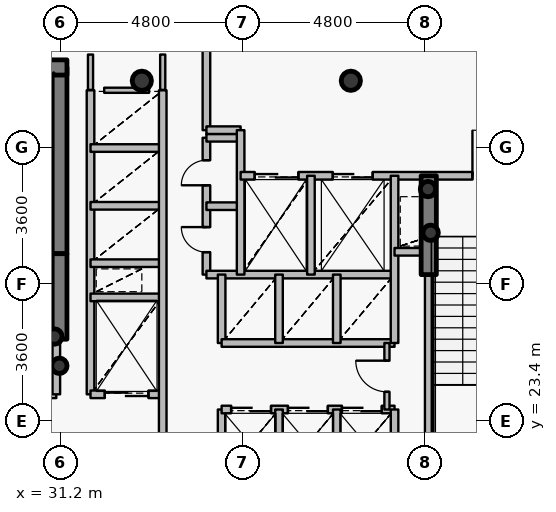
"""IFC4 building model, lengths in metres.
Left out: names, types, materials, properties, quantities, classifications, styles, units other than length and angle.
Written with IfcOpenShell. Run it as: python <this file> out.ifc"""

import sys

from ifc_helpers import new_model, si_unit, direction, frame, frame_2d, origin, origin_2d, place, context, subcontext, project, spatial, rectangle, hollow_circle, extrude, source, transform, mapped, element, fill, save


model = new_model("IFC4")
c1 = context("Model", 3, precision=1e-05, world=origin(), true_north=direction((0.0, 1.0)))
c2 = subcontext(c1, "Body", "Model", "MODEL_VIEW")
j1 = project(units=[si_unit("LENGTHUNIT", "METRE"), si_unit("PLANEANGLEUNIT", "RADIAN")], contexts=[c1])
p1 = place(None, origin())
s1 = spatial("IfcSite", under=j1, at=p1, CompositionType="ELEMENT")
p2 = place(p1, origin())
s2 = spatial("IfcBuilding", under=s1, at=p2, CompositionType="ELEMENT")
p3 = place(p2, frame((0.0, 0.0, 70.2)))
s3 = spatial("IfcBuildingStorey", under=s2, at=p3, CompositionType="ELEMENT", Elevation=70.2)
for number, where, z_axis, x_axis in (
    (1, (38.85, 32.35, 0.0), (0.0, 0.0, 1.0), (1.0, 0.0, 0.0)),
    (2, (33.35, 32.35, 0.0), (0.0, 0.0, 1.0), (1.0, 0.0, 0.0)),
):
    element("IfcColumn", number, at=place(p3, frame(where, z_axis=z_axis, x_axis=x_axis)), inside=s3, PredefinedType="COLUMN", context=c2, shape_type="SweptSolid", body=[
        extrude(hollow_circle(Radius=0.254, WallThickness=0.02, at=origin_2d()), origin(), (0.0, 0.0, 1.0), 4.2),
    ])
p4 = place(p3, frame((31.18, 27.8, 0.0), z_axis=(0.0, 0.0, 1.0), x_axis=(0.0, 1.0, 0.0)))
e3 = element("IfcWall", 3, at=p4, inside=s3, PredefinedType="SHEAR", context=c2, shape_type="SweptSolid", body=[
    extrude(rectangle(XDim=4.9, YDim=0.4, at=frame_2d((2.45, 0.0))), origin(), (0.0, 0.0, 1.0), 4.2),
])
p5 = place(p3, frame((27.28, 32.7, 0.0), z_axis=(0.0, 0.0, 1.0), x_axis=(1.0, 0.0, 0.0)))
e4 = element("IfcWall", 4, at=p5, inside=s3, PredefinedType="SHEAR", context=c2, shape_type="SweptSolid", body=[
    extrude(rectangle(XDim=4.1, YDim=0.4, at=frame_2d((2.05, 0.0))), origin(), (0.0, 0.0, 1.0), 4.2),
])
for number, where, z_axis, x_axis in (
    (5, (31.05, 25.62, 0.0), (0.0, 0.0, 1.0), (1.0, 0.0, 0.0)),
    (6, (31.18, 24.85, 0.0), (0.0, 0.0, 1.0), (1.0, 0.0, 0.0)),
    (7, (40.95, 28.35, 0.0), (0.0, 0.0, 1.0), (1.0, 0.0, 0.0)),
    (8, (40.88, 29.5, 0.0), (0.0, 0.0, 1.0), (1.0, 0.0, 0.0)),
):
    element("IfcColumn", number, at=place(p3, frame(where, z_axis=z_axis, x_axis=x_axis)), inside=s3, PredefinedType="COLUMN", context=c2, shape_type="SweptSolid", body=[
        extrude(hollow_circle(Radius=0.203, WallThickness=0.016, at=origin_2d()), origin(), (0.0, 0.0, 1.0), 4.2),
    ])
p6 = place(p3, frame((31.18, 25.55, 0.0), z_axis=(0.0, 0.0, 1.0), x_axis=(0.0, 1.0, 0.0)))
e9 = element("IfcWall", 9, at=p6, inside=s3, PredefinedType="SHEAR", context=c2, shape_type="SweptSolid", body=[
    extrude(rectangle(XDim=2.25, YDim=0.4, at=frame_2d((1.125, 0.0))), origin(), (0.0, 0.0, 1.0), 3.55),
])
p7 = place(p3, frame((40.9, 27.25, 0.0), z_axis=(0.0, 0.0, 1.0), x_axis=(0.0, 1.0, 0.0)))
e10 = element("IfcWall", 10, at=p7, inside=s3, PredefinedType="SHEAR", context=c2, shape_type="SweptSolid", body=[
    extrude(rectangle(XDim=2.6, YDim=0.4, at=frame_2d((1.3, 0.0))), origin(), (0.0, 0.0, 1.0), 3.55),
])
p8 = place(p3, frame((27.56, 24.1, 0.0), z_axis=(0.0, 0.0, 1.0), x_axis=(1.0, 0.0, 0.0)))
e11 = element("IfcWall", 11, at=p8, inside=s3, PredefinedType="PARTITIONING", context=c2, shape_type="SweptSolid", body=[
    extrude(rectangle(XDim=3.54, YDim=0.2, at=frame_2d((1.77, 0.0))), origin(), (0.0, 0.0, 1.0), 3.95),
])
p9 = place(p8, frame((1.17, 0.0, 0.0)))
e12 = element("IfcOpeningElement", 12, at=p9, cuts=e11, PredefinedType="OPENING", context=c2, shape_type="SweptSolid", body=[
    extrude(rectangle(XDim=1.2, YDim=2.15, at=origin_2d()), frame((0.6, 0.11, 1.075), z_axis=(0.0, -1.0, 0.0), x_axis=(1.0, 0.0, 0.0)), (0.0, 0.0, 1.0), 0.22),
])
p10 = place(p3, frame((31.1, 24.1, 0.0), z_axis=(0.0, 0.0, 1.0), x_axis=(0.0, 1.0, 0.0)))
e13 = element("IfcWall", 13, at=p10, inside=s3, PredefinedType="PARTITIONING", context=c2, shape_type="SweptSolid", body=[
    extrude(rectangle(XDim=1.44, YDim=0.2, at=frame_2d((0.72, 0.0))), origin(), (0.0, 0.0, 1.0), 3.95),
])
p11 = place(p3, frame((32.0, 24.1, 0.0), z_axis=(0.0, 0.0, 1.0), x_axis=(0.0, 1.0, 0.0)))
e14 = element("IfcWall", 14, at=p11, inside=s3, PredefinedType="PARTITIONING", context=c2, shape_type="SweptSolid", body=[
    extrude(rectangle(XDim=8.0, YDim=0.2, at=frame_2d((4.0, 0.0))), origin(), (0.0, 0.0, 1.0), 3.95),
])
p12 = place(p3, frame((32.0, 24.1, 0.0), z_axis=(0.0, 0.0, 1.0), x_axis=(1.0, 0.0, 0.0)))
e15 = element("IfcWall", 15, at=p12, inside=s3, PredefinedType="PARTITIONING", context=c2, shape_type="SweptSolid", body=[
    extrude(rectangle(XDim=1.9, YDim=0.2, at=frame_2d((0.95, 0.0))), origin(), (0.0, 0.0, 1.0), 3.535),
])
p13 = place(p12, frame((0.375, 0.0, 0.0)))
e16 = element("IfcOpeningElement", 16, at=p13, cuts=e15, PredefinedType="OPENING", context=c2, shape_type="SweptSolid", body=[
    extrude(rectangle(XDim=1.15, YDim=2.15, at=origin_2d()), frame((0.575, 0.11, 1.075), z_axis=(0.0, -1.0, 0.0), x_axis=(1.0, 0.0, 0.0)), (0.0, 0.0, 1.0), 0.22),
])
for number, where, z_axis, x_axis in (
    (17, (32.0, 26.65, 0.0), (0.0, 0.0, 1.0), (1.0, 0.0, 0.0)),
    (18, (32.0, 27.55, 0.0), (0.0, 0.0, 1.0), (1.0, 0.0, 0.0)),
    (19, (32.0, 29.06, 0.0), (0.0, 0.0, 1.0), (1.0, 0.0, 0.0)),
    (20, (32.0, 30.58, 0.0), (0.0, 0.0, 1.0), (1.0, 0.0, 0.0)),
):
    element("IfcWall", number, at=place(p3, frame(where, z_axis=z_axis, x_axis=x_axis)), inside=s3, PredefinedType="PARTITIONING", context=c2, shape_type="SweptSolid", body=[
        extrude(rectangle(XDim=1.9, YDim=0.2, at=frame_2d((0.95, 0.0))), origin(), (0.0, 0.0, 1.0), 3.535),
    ])
p14 = place(p3, frame((33.9, 20.7, 0.0), z_axis=(0.0, 0.0, 1.0), x_axis=(0.0, 1.0, 0.0)))
e21 = element("IfcWall", 21, at=p14, inside=s3, PredefinedType="PARTITIONING", context=c2, shape_type="SweptSolid", body=[
    extrude(rectangle(XDim=11.4, YDim=0.2, at=frame_2d((5.7, 0.0))), origin(), (0.0, 0.0, 1.0), 3.535),
])
p15 = place(p3, frame((35.05, 27.25, 0.0), z_axis=(0.0, 0.0, 1.0), x_axis=(0.0, 1.0, 0.0)))
e22 = element("IfcWall", 22, at=p15, inside=s3, PredefinedType="PARTITIONING", context=c2, shape_type="SweptSolid", body=[
    extrude(rectangle(XDim=3.6, YDim=0.2, at=frame_2d((1.8, 0.0))), origin(), (0.0, 0.0, 1.0), 3.95),
])
p16 = place(p15, frame((0.59, 0.0, 0.0)))
e23 = element("IfcOpeningElement", 23, at=p16, cuts=e22, PredefinedType="OPENING", context=c2, shape_type="SweptSolid", body=[
    extrude(rectangle(XDim=0.66, YDim=2.05, at=origin_2d()), frame((0.33, 0.11, 1.025), z_axis=(0.0, -1.0, 0.0), x_axis=(1.0, 0.0, 0.0)), (0.0, 0.0, 1.0), 0.22),
])
p17 = place(p15, frame((2.35, 0.0, 0.0)))
e24 = element("IfcOpeningElement", 24, at=p17, cuts=e22, PredefinedType="OPENING", context=c2, shape_type="SweptSolid", body=[
    extrude(rectangle(XDim=0.66, YDim=2.05, at=origin_2d()), frame((0.33, 0.11, 1.025), z_axis=(0.0, -1.0, 0.0), x_axis=(1.0, 0.0, 0.0)), (0.0, 0.0, 1.0), 0.22),
])
p18 = place(p3, frame((35.05, 27.25, 0.0), z_axis=(0.0, 0.0, 1.0), x_axis=(1.0, 0.0, 0.0)))
e25 = element("IfcWall", 25, at=p18, inside=s3, PredefinedType="PARTITIONING", context=c2, shape_type="SweptSolid", body=[
    extrude(rectangle(XDim=4.95, YDim=0.2, at=frame_2d((2.475, 0.0))), origin(), (0.0, 0.0, 1.0), 3.535),
])
for number, where, z_axis, x_axis in (
    (26, (35.05, 29.05, 0.0), (0.0, 0.0, 1.0), (1.0, 0.0, 0.0)),
    (27, (35.05, 30.85, 0.0), (0.0, 0.0, 1.0), (1.0, 0.0, 0.0)),
):
    element("IfcWall", number, at=place(p3, frame(where, z_axis=z_axis, x_axis=x_axis)), inside=s3, PredefinedType="PARTITIONING", context=c2, shape_type="SweptSolid", body=[
        extrude(rectangle(XDim=0.9, YDim=0.2, at=frame_2d((0.45, 0.0))), origin(), (0.0, 0.0, 1.0), 3.95),
    ])
p19 = place(p3, frame((35.05, 31.05, 0.0), z_axis=(0.0, 0.0, 1.0), x_axis=(0.0, 1.0, 0.0)))
e28 = element("IfcWall", 28, at=p19, inside=s3, PredefinedType="PARTITIONING", context=c2, shape_type="SweptSolid", body=[
    extrude(rectangle(XDim=2.25, YDim=0.2, at=frame_2d((1.125, 0.0))), origin(), (0.0, 0.0, 1.0), 3.535),
])
p20 = place(p3, frame((35.05, 31.05, 0.0), z_axis=(0.0, 0.0, 1.0), x_axis=(1.0, 0.0, 0.0)))
e29 = element("IfcWall", 29, at=p20, inside=s3, PredefinedType="PARTITIONING", context=c2, shape_type="SweptSolid", body=[
    extrude(rectangle(XDim=0.9, YDim=0.2, at=frame_2d((0.45, 0.0))), origin(), (0.0, 0.0, 1.0), 3.95),
])
p21 = place(p3, frame((35.45, 21.9, 0.0), z_axis=(0.0, 0.0, 1.0), x_axis=(0.0, 1.0, 0.0)))
e30 = element("IfcWall", 30, at=p21, inside=s3, PredefinedType="PARTITIONING", context=c2, shape_type="SweptSolid", body=[
    extrude(rectangle(XDim=1.8, YDim=0.2, at=frame_2d((0.9, 0.0))), origin(), (0.0, 0.0, 1.0), 3.95),
])
p22 = place(p3, frame((35.45, 23.7, 0.0), z_axis=(0.0, 0.0, 1.0), x_axis=(1.0, 0.0, 0.0)))
e31 = element("IfcWall", 31, at=p22, inside=s3, PredefinedType="PARTITIONING", context=c2, shape_type="SweptSolid", body=[
    extrude(rectangle(XDim=4.55, YDim=0.2, at=frame_2d((2.275, 0.0))), origin(), (0.0, 0.0, 1.0), 3.535),
])
p23 = place(p22, frame((0.25, 0.0, 0.0)))
e32 = element("IfcOpeningElement", 32, at=p23, cuts=e31, PredefinedType="OPENING", context=c2, shape_type="SweptSolid", body=[
    extrude(rectangle(XDim=1.05, YDim=2.15, at=origin_2d()), frame((0.525, 0.11, 1.075), z_axis=(0.0, -1.0, 0.0), x_axis=(1.0, 0.0, 0.0)), (0.0, 0.0, 1.0), 0.22),
])
p24 = place(p22, frame((1.745, 0.0, 0.0)))
e33 = element("IfcOpeningElement", 33, at=p24, cuts=e31, PredefinedType="OPENING", context=c2, shape_type="SweptSolid", body=[
    extrude(rectangle(XDim=1.05, YDim=2.15, at=origin_2d()), frame((0.525, 0.11, 1.075), z_axis=(0.0, -1.0, 0.0), x_axis=(1.0, 0.0, 0.0)), (0.0, 0.0, 1.0), 0.22),
])
p25 = place(p22, frame((3.165, 0.0, 0.0)))
e34 = element("IfcOpeningElement", 34, at=p25, cuts=e31, PredefinedType="OPENING", context=c2, shape_type="SweptSolid", body=[
    extrude(rectangle(XDim=1.05, YDim=2.15, at=origin_2d()), frame((0.525, 0.11, 1.075), z_axis=(0.0, -1.0, 0.0), x_axis=(1.0, 0.0, 0.0)), (0.0, 0.0, 1.0), 0.22),
])
p26 = place(p3, frame((35.45, 25.45, 0.0), z_axis=(0.0, 0.0, 1.0), x_axis=(0.0, 1.0, 0.0)))
e35 = element("IfcWall", 35, at=p26, inside=s3, PredefinedType="PARTITIONING", context=c2, shape_type="SweptSolid", body=[
    extrude(rectangle(XDim=1.8, YDim=0.2, at=frame_2d((0.9, 0.0))), origin(), (0.0, 0.0, 1.0), 3.95),
])
p27 = place(p3, frame((35.45, 25.45, 0.0), z_axis=(0.0, 0.0, 1.0), x_axis=(1.0, 0.0, 0.0)))
e36 = element("IfcWall", 36, at=p27, inside=s3, PredefinedType="PARTITIONING", context=c2, shape_type="SweptSolid", body=[
    extrude(rectangle(XDim=4.55, YDim=0.2, at=frame_2d((2.275, 0.0))), origin(), (0.0, 0.0, 1.0), 3.535),
])
p28 = place(p3, frame((35.95, 27.25, 0.0), z_axis=(0.0, 0.0, 1.0), x_axis=(0.0, 1.0, 0.0)))
e37 = element("IfcWall", 37, at=p28, inside=s3, PredefinedType="PARTITIONING", context=c2, shape_type="SweptSolid", body=[
    extrude(rectangle(XDim=3.8, YDim=0.2, at=frame_2d((1.9, 0.0))), origin(), (0.0, 0.0, 1.0), 3.95),
])
p29 = place(p3, frame((35.95, 29.85, 0.0), z_axis=(0.0, 0.0, 1.0), x_axis=(1.0, 0.0, 0.0)))
e38 = element("IfcWall", 38, at=p29, inside=s3, PredefinedType="PARTITIONING", context=c2, shape_type="SweptSolid", body=[
    extrude(rectangle(XDim=8.49, YDim=0.2, at=frame_2d((4.245, 0.0))), origin(), (0.0, 0.0, 1.0), 3.535),
])
p30 = place(p29, frame((6.1, 0.0, 0.0)))
e39 = element("IfcOpeningElement", 39, at=p30, cuts=e38, PredefinedType="OPENING", context=c2, shape_type="SweptSolid", body=[
    extrude(rectangle(XDim=1.2, YDim=2.15, at=origin_2d()), frame((0.6, 0.11, 1.075), z_axis=(0.0, -1.0, 0.0), x_axis=(1.0, 0.0, 0.0)), (0.0, 0.0, 1.0), 0.22),
])
p31 = place(p29, frame((0.37, 0.0, 0.0)))
e40 = element("IfcOpeningElement", 40, at=p31, cuts=e38, PredefinedType="OPENING", context=c2, shape_type="SweptSolid", body=[
    extrude(rectangle(XDim=1.15, YDim=2.15, at=origin_2d()), frame((0.575, 0.11, 1.075), z_axis=(0.0, -1.0, 0.0), x_axis=(1.0, 0.0, 0.0)), (0.0, 0.0, 1.0), 0.22),
])
p32 = place(p29, frame((2.425, 0.0, 0.0)))
e41 = element("IfcOpeningElement", 41, at=p32, cuts=e38, PredefinedType="OPENING", context=c2, shape_type="SweptSolid", body=[
    extrude(rectangle(XDim=1.05, YDim=2.15, at=origin_2d()), frame((0.525, 0.11, 1.075), z_axis=(0.0, -1.0, 0.0), x_axis=(1.0, 0.0, 0.0)), (0.0, 0.0, 1.0), 0.22),
])
for number, where, z_axis, x_axis in (
    (42, (36.96, 21.9, 0.0), (0.0, 0.0, 1.0), (0.0, 1.0, 0.0)),
    (43, (36.96, 25.45, 0.0), (0.0, 0.0, 1.0), (0.0, 1.0, 0.0)),
):
    element("IfcWall", number, at=place(p3, frame(where, z_axis=z_axis, x_axis=x_axis)), inside=s3, PredefinedType="PARTITIONING", context=c2, shape_type="SweptSolid", body=[
        extrude(rectangle(XDim=1.8, YDim=0.2, at=frame_2d((0.9, 0.0))), origin(), (0.0, 0.0, 1.0), 3.95),
    ])
p33 = place(p3, frame((37.8, 27.25, 0.0), z_axis=(0.0, 0.0, 1.0), x_axis=(0.0, 1.0, 0.0)))
e44 = element("IfcWall", 44, at=p33, inside=s3, PredefinedType="PARTITIONING", context=c2, shape_type="SweptSolid", body=[
    extrude(rectangle(XDim=2.6, YDim=0.2, at=frame_2d((1.3, 0.0))), origin(), (0.0, 0.0, 1.0), 3.95),
])
for number, where, z_axis, x_axis in (
    (45, (38.48, 21.9, 0.0), (0.0, 0.0, 1.0), (0.0, 1.0, 0.0)),
    (46, (38.48, 25.45, 0.0), (0.0, 0.0, 1.0), (0.0, 1.0, 0.0)),
):
    element("IfcWall", number, at=place(p3, frame(where, z_axis=z_axis, x_axis=x_axis)), inside=s3, PredefinedType="PARTITIONING", context=c2, shape_type="SweptSolid", body=[
        extrude(rectangle(XDim=1.8, YDim=0.2, at=frame_2d((0.9, 0.0))), origin(), (0.0, 0.0, 1.0), 3.95),
    ])
p34 = place(p3, frame((39.8, 23.7, 0.0), z_axis=(0.0, 0.0, 1.0), x_axis=(0.0, 1.0, 0.0)))
e47 = element("IfcWall", 47, at=p34, inside=s3, PredefinedType="PARTITIONING", context=c2, shape_type="SweptSolid", body=[
    extrude(rectangle(XDim=1.75, YDim=0.135, at=frame_2d((0.875, 0.0))), origin(), (0.0, 0.0, 1.0), 3.95),
])
p35 = place(p34, frame((0.465, 0.0, 0.0)))
e48 = element("IfcOpeningElement", 48, at=p35, cuts=e47, PredefinedType="OPENING", context=c2, shape_type="SweptSolid", body=[
    extrude(rectangle(XDim=0.82, YDim=2.1, at=origin_2d()), frame((0.41, 0.078, 1.05), z_axis=(0.0, -1.0, 0.0), x_axis=(1.0, 0.0, 0.0)), (0.0, 0.0, 1.0), 0.155),
])
p36 = place(p3, frame((40.0, 21.9, 0.0), z_axis=(0.0, 0.0, 1.0), x_axis=(0.0, 1.0, 0.0)))
e49 = element("IfcWall", 49, at=p36, inside=s3, PredefinedType="PARTITIONING", context=c2, shape_type="SweptSolid", body=[
    extrude(rectangle(XDim=1.8, YDim=0.2, at=frame_2d((0.9, 0.0))), origin(), (0.0, 0.0, 1.0), 3.95),
])
p37 = place(p3, frame((40.0, 25.45, 0.0), z_axis=(0.0, 0.0, 1.0), x_axis=(0.0, 1.0, 0.0)))
e50 = element("IfcWall", 50, at=p37, inside=s3, PredefinedType="PARTITIONING", context=c2, shape_type="SweptSolid", body=[
    extrude(rectangle(XDim=4.4, YDim=0.2, at=frame_2d((2.2, 0.0))), origin(), (0.0, 0.0, 1.0), 3.95),
])
p38 = place(p3, frame((40.0, 27.85, 0.0), z_axis=(0.0, 0.0, 1.0), x_axis=(1.0, 0.0, 0.0)))
e51 = element("IfcWall", 51, at=p38, inside=s3, PredefinedType="PARTITIONING", context=c2, shape_type="SweptSolid", body=[
    extrude(rectangle(XDim=0.9, YDim=0.2, at=frame_2d((0.45, 0.0))), origin(), (0.0, 0.0, 1.0), 3.95),
])
p39 = place(p3, frame((40.9, 21.33, 0.0), z_axis=(0.0, 0.0, 1.0), x_axis=(0.0, 1.0, 0.0)))
e52 = element("IfcWall", 52, at=p39, inside=s3, PredefinedType="PARTITIONING", context=c2, shape_type="SweptSolid", body=[
    extrude(rectangle(XDim=5.91, YDim=0.2, at=frame_2d((2.955, 0.0))), origin(), (0.0, 0.0, 1.0), 3.485),
])
p40 = place(p3, frame((32.36, 32.1, 0.0), z_axis=(0.0, 0.0, 1.0), x_axis=(1.0, 0.0, 0.0)))
e53 = element("IfcWall", 53, at=p40, inside=s3, PredefinedType="PARTITIONING", context=c2, shape_type="SweptSolid", body=[
    extrude(rectangle(XDim=1.18, YDim=0.135, at=frame_2d((0.59, 0.0))), origin(), (0.0, 0.0, 1.0), 3.535),
])
p41 = place(p3, frame((32.0, 33.04, 0.0), z_axis=(0.0, 0.0, 1.0), x_axis=(0.0, -1.0, 0.0)))
e54 = element("IfcWall", 54, at=p41, inside=s3, PredefinedType="PARTITIONING", context=c2, shape_type="SweptSolid", body=[
    extrude(rectangle(XDim=0.93, YDim=0.135, at=frame_2d((0.465, 0.0))), origin(), (0.0, 0.0, 1.0), 3.485),
])
p42 = place(p3, frame((33.9, 32.11, 0.0), z_axis=(0.0, 0.0, 1.0), x_axis=(0.0, 1.0, 0.0)))
e55 = element("IfcWall", 55, at=p42, inside=s3, PredefinedType="PARTITIONING", context=c2, shape_type="SweptSolid", body=[
    extrude(rectangle(XDim=0.93, YDim=0.135, at=frame_2d((0.465, 0.0))), origin(), (0.0, 0.0, 1.0), 3.535),
])
m1 = source(origin(), c2, "Body", "SweptSolid", [
    extrude(rectangle(XDim=1.2, YDim=2.15, at=origin_2d()), frame((0.6, 0.025, 1.075), z_axis=(0.0, -1.0, 0.0), x_axis=(1.0, 0.0, 0.0)), (0.0, 0.0, 1.0), 0.05),
])
p43 = place(p30, origin())
e56 = element("IfcDoor", 56, at=p43, inside=s3, OperationType="SINGLE_SWING_LEFT", PredefinedType="DOOR", context=c2, shape_type="MappedRepresentation", body=[
    mapped(m1, transform((0.0, 0.0, 0.0), x_axis=(1.0, 0.0, 0.0), y_axis=(0.0, 1.0, 0.0), z_axis=(0.0, 0.0, 1.0), scale=1.0)),
])
fill(e39, e56)
m2 = source(origin(), c2, "Body", "SweptSolid", [
    extrude(rectangle(XDim=1.15, YDim=2.15, at=origin_2d()), frame((0.575, 0.025, 1.075), z_axis=(0.0, -1.0, 0.0), x_axis=(1.0, 0.0, 0.0)), (0.0, 0.0, 1.0), 0.05),
])
p44 = place(p31, origin())
e57 = element("IfcDoor", 57, at=p44, inside=s3, OperationType="DOUBLE_DOOR_SLIDING", PredefinedType="USERDEFINED", context=c2, shape_type="MappedRepresentation", body=[
    mapped(m2, transform((0.0, 0.0, 0.0), x_axis=(1.0, 0.0, 0.0), y_axis=(0.0, 1.0, 0.0), z_axis=(0.0, 0.0, 1.0), scale=1.0)),
])
fill(e40, e57)
p45 = place(p13, origin())
e58 = element("IfcDoor", 58, at=p45, inside=s3, OperationType="DOUBLE_DOOR_SLIDING", PredefinedType="USERDEFINED", context=c2, shape_type="MappedRepresentation", body=[
    mapped(m2, transform((0.0, 0.0, 0.0), x_axis=(1.0, 0.0, 0.0), y_axis=(0.0, 1.0, 0.0), z_axis=(0.0, 0.0, 1.0), scale=1.0)),
])
fill(e16, e58)
m3 = source(origin(), c2, "Body", "SweptSolid", [
    extrude(rectangle(XDim=1.05, YDim=2.15, at=origin_2d()), frame((0.525, 0.025, 1.075), z_axis=(0.0, -1.0, 0.0), x_axis=(1.0, 0.0, 0.0)), (0.0, 0.0, 1.0), 0.05),
])
p46 = place(p32, origin())
e59 = element("IfcDoor", 59, at=p46, inside=s3, OperationType="DOUBLE_DOOR_SLIDING", PredefinedType="USERDEFINED", context=c2, shape_type="MappedRepresentation", body=[
    mapped(m3, transform((0.0, 0.0, 0.0), x_axis=(1.0, 0.0, 0.0), y_axis=(0.0, 1.0, 0.0), z_axis=(0.0, 0.0, 1.0), scale=1.0)),
])
fill(e41, e59)
p47 = place(p23, origin())
e60 = element("IfcDoor", 60, at=p47, inside=s3, OperationType="DOUBLE_DOOR_SLIDING", PredefinedType="USERDEFINED", context=c2, shape_type="MappedRepresentation", body=[
    mapped(m3, transform((0.0, 0.0, 0.0), x_axis=(1.0, 0.0, 0.0), y_axis=(0.0, 1.0, 0.0), z_axis=(0.0, 0.0, 1.0), scale=1.0)),
])
fill(e32, e60)
p48 = place(p24, origin())
e61 = element("IfcDoor", 61, at=p48, inside=s3, OperationType="DOUBLE_DOOR_SLIDING", PredefinedType="USERDEFINED", context=c2, shape_type="MappedRepresentation", body=[
    mapped(m3, transform((0.0, 0.0, 0.0), x_axis=(1.0, 0.0, 0.0), y_axis=(0.0, 1.0, 0.0), z_axis=(0.0, 0.0, 1.0), scale=1.0)),
])
fill(e33, e61)
p49 = place(p25, origin())
e62 = element("IfcDoor", 62, at=p49, inside=s3, OperationType="DOUBLE_DOOR_SLIDING", PredefinedType="USERDEFINED", context=c2, shape_type="MappedRepresentation", body=[
    mapped(m3, transform((0.0, 0.0, 0.0), x_axis=(1.0, 0.0, 0.0), y_axis=(0.0, 1.0, 0.0), z_axis=(0.0, 0.0, 1.0), scale=1.0)),
])
fill(e34, e62)
m4 = source(origin(), c2, "Body", "SweptSolid", [
    extrude(rectangle(XDim=0.66, YDim=2.05, at=origin_2d()), frame((0.33, 0.025, 1.025), z_axis=(0.0, -1.0, 0.0), x_axis=(1.0, 0.0, 0.0)), (0.0, 0.0, 1.0), 0.05),
])
p50 = place(p16, origin())
e63 = element("IfcDoor", 63, at=p50, inside=s3, OperationType="SINGLE_SWING_RIGHT", PredefinedType="USERDEFINED", context=c2, shape_type="MappedRepresentation", body=[
    mapped(m4, transform((0.0, 0.0, 0.0), x_axis=(1.0, 0.0, 0.0), y_axis=(0.0, 1.0, 0.0), z_axis=(0.0, 0.0, 1.0), scale=1.0)),
])
fill(e23, e63)
p51 = place(p17, origin())
e64 = element("IfcDoor", 64, at=p51, inside=s3, OperationType="SINGLE_SWING_LEFT", PredefinedType="USERDEFINED", context=c2, shape_type="MappedRepresentation", body=[
    mapped(m4, transform((0.0, 0.0, 0.0), x_axis=(1.0, 0.0, 0.0), y_axis=(0.0, 1.0, 0.0), z_axis=(0.0, 0.0, 1.0), scale=1.0)),
])
fill(e24, e64)
m5 = source(origin(), c2, "Body", "SweptSolid", [
    extrude(rectangle(XDim=0.82, YDim=2.1, at=origin_2d()), frame((0.41, 0.025, 1.05), z_axis=(0.0, -1.0, 0.0), x_axis=(1.0, 0.0, 0.0)), (0.0, 0.0, 1.0), 0.05),
])
p52 = place(p35, origin())
e65 = element("IfcDoor", 65, at=p52, inside=s3, OperationType="SINGLE_SWING_RIGHT", PredefinedType="DOOR", context=c2, shape_type="MappedRepresentation", body=[
    mapped(m5, transform((0.0, 0.0, 0.0), x_axis=(1.0, 0.0, 0.0), y_axis=(0.0, 1.0, 0.0), z_axis=(0.0, 0.0, 1.0), scale=1.0)),
])
fill(e48, e65)
save(model, sys.argv[1])
